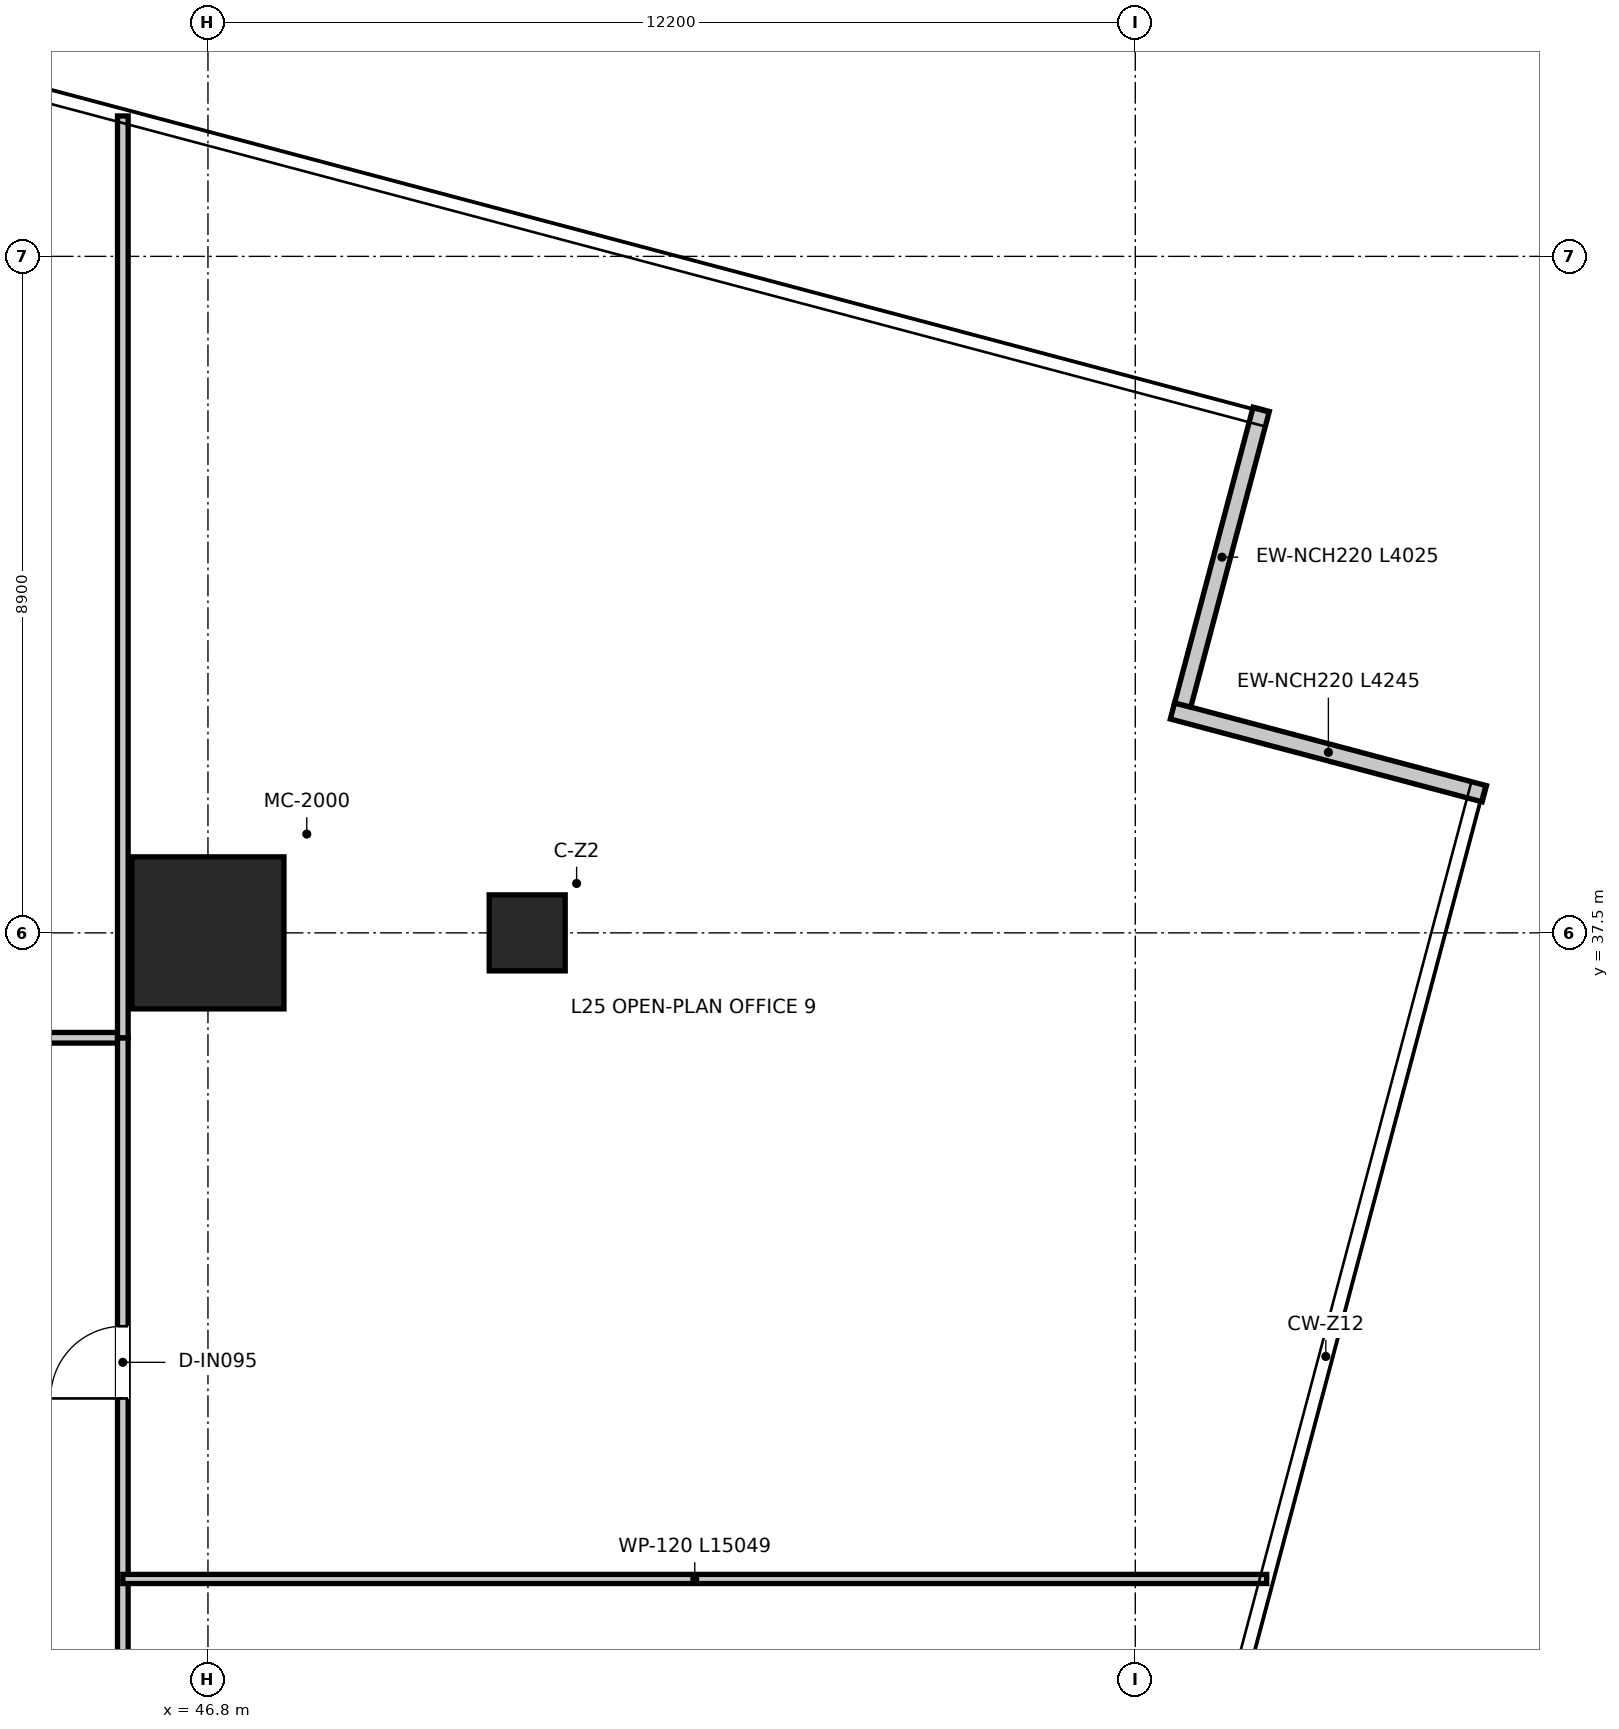
"""IFC4 building model, lengths in metres.
Left out: names, types, materials, properties, quantities, classifications, styles, units other than length and angle.
Written with IfcOpenShell. Run it as: python <this file> out.ifc"""

import sys

from ifc_helpers import new_model, si_unit, direction, frame, frame_2d, origin, origin_2d, place, context, subcontext, project, spatial, rectangle, extrude, source, transform, mapped, element, fill, save


model = new_model("IFC4")
c1 = context("Model", 3, precision=1e-05, world=origin(), true_north=direction((0.0, 1.0)))
c2 = subcontext(c1, "Body", "Model", "MODEL_VIEW")
j1 = project(units=[si_unit("LENGTHUNIT", "METRE"), si_unit("PLANEANGLEUNIT", "RADIAN")], contexts=[c1])
p1 = place(None, origin())
s1 = spatial("IfcSite", under=j1, at=p1, CompositionType="ELEMENT")
p2 = place(p1, origin())
s2 = spatial("IfcBuilding", under=s1, at=p2, CompositionType="ELEMENT")
p3 = place(p2, frame((0.0, 0.0, 105.85)))
s3 = spatial("IfcBuildingStorey", under=s2, at=p3, CompositionType="ELEMENT", Elevation=105.85)
m1 = source(origin(), c2, "Body", "SweptSolid", [
    extrude(rectangle(XDim=2.0, YDim=2.0, at=origin_2d()), origin(), (0.0, 0.0, 1.0), 3.95),
])
p4 = place(p3, frame((46.8, 37.5, 0.0), z_axis=(0.0, 0.0, 1.0), x_axis=(1.0, 0.0, 0.0)))
e1 = element("IfcColumn", 1, at=p4, inside=s3, PredefinedType="USERDEFINED", context=c2, shape_type="MappedRepresentation", body=[
    mapped(m1, transform((0.0, 0.0, 0.0), x_axis=(1.0, 0.0, 0.0), y_axis=(0.0, 1.0, 0.0), z_axis=(0.0, 0.0, 1.0), scale=1.0)),
])
m2 = source(origin(), c2, "Body", "SweptSolid", [
    extrude(rectangle(XDim=1.0, YDim=1.0, at=origin_2d()), origin(), (0.0, 0.0, 1.0), 3.95),
])
p5 = place(p3, frame((51.0, 37.5, 0.0), z_axis=(0.0, 0.0, 1.0), x_axis=(1.0, 0.0, 0.0)))
e2 = element("IfcColumn", 2, at=p5, inside=s3, PredefinedType="COLUMN", context=c2, shape_type="MappedRepresentation", body=[
    mapped(m2, transform((0.0, 0.0, 0.0), x_axis=(1.0, 0.0, 0.0), y_axis=(0.0, 1.0, 0.0), z_axis=(0.0, 0.0, 1.0), scale=1.0)),
])
p6 = place(p3, frame((63.592, 39.33, 0.0), z_axis=(0.0, 0.0, 1.0), x_axis=(-0.966482674278, 0.256731845164, 0.0)))
e3 = element("IfcWall", 3, at=p6, inside=s3, PredefinedType="ELEMENTEDWALL", context=c2, shape_type="SweptSolid", body=[
    extrude(rectangle(XDim=4.245, YDim=0.22, at=frame_2d((2.123, 0.0))), origin(), (0.0, 0.0, 1.0), 3.67),
])
p7 = place(p3, frame((59.624, 40.498, 0.0), z_axis=(0.0, 0.0, 1.0), x_axis=(0.256696053144, 0.966492181189, 0.0)))
e4 = element("IfcWall", 4, at=p7, inside=s3, PredefinedType="ELEMENTEDWALL", context=c2, shape_type="SweptSolid", body=[
    extrude(rectangle(XDim=4.025, YDim=0.22, at=frame_2d((2.012, 0.0))), origin(), (0.0, 0.0, 1.0), 3.67),
])
p8 = place(p3, frame((26.32, 36.12, 0.0), z_axis=(0.0, 0.0, 1.0), x_axis=(1.0, 0.0, 0.0)))
e5 = element("IfcWall", 5, at=p8, inside=s3, PredefinedType="PARTITIONING", context=c2, shape_type="SweptSolid", body=[
    extrude(rectangle(XDim=19.36, YDim=0.14, at=frame_2d((9.68, 0.0))), origin(), (0.0, 0.0, 1.0), 3.08),
])
p9 = place(p8, frame((1.265, 0.0, 0.0)))
e6 = element("IfcOpeningElement", 6, at=p9, cuts=e5, PredefinedType="OPENING", context=c2, shape_type="SweptSolid", body=[
    extrude(rectangle(XDim=0.95, YDim=2.1, at=frame_2d((0.475, 1.05))), frame((0.0, 0.08, 0.0), z_axis=(0.0, -1.0, 0.0), x_axis=(1.0, 0.0, 0.0)), (0.0, 0.0, 1.0), 0.16),
])
p10 = place(p8, frame((5.855, 0.0, 0.0)))
e7 = element("IfcOpeningElement", 7, at=p10, cuts=e5, PredefinedType="OPENING", context=c2, shape_type="SweptSolid", body=[
    extrude(rectangle(XDim=0.95, YDim=2.1, at=frame_2d((0.475, 1.05))), frame((0.0, 0.08, 0.0), z_axis=(0.0, -1.0, 0.0), x_axis=(1.0, 0.0, 0.0)), (0.0, 0.0, 1.0), 0.16),
])
p11 = place(p8, frame((11.555, 0.0, 0.0)))
e8 = element("IfcOpeningElement", 8, at=p11, cuts=e5, PredefinedType="OPENING", context=c2, shape_type="SweptSolid", body=[
    extrude(rectangle(XDim=0.95, YDim=2.1, at=frame_2d((0.475, 1.05))), frame((0.0, 0.08, 0.0), z_axis=(0.0, -1.0, 0.0), x_axis=(1.0, 0.0, 0.0)), (0.0, 0.0, 1.0), 0.16),
])
p12 = place(p8, frame((16.645, 0.0, 0.0)))
e9 = element("IfcOpeningElement", 9, at=p12, cuts=e5, PredefinedType="OPENING", context=c2, shape_type="SweptSolid", body=[
    extrude(rectangle(XDim=0.95, YDim=2.1, at=frame_2d((0.475, 1.05))), frame((0.0, 0.08, 0.0), z_axis=(0.0, -1.0, 0.0), x_axis=(1.0, 0.0, 0.0)), (0.0, 0.0, 1.0), 0.16),
])
p13 = place(p3, frame((45.68, 10.5, 0.0), z_axis=(0.0, 0.0, 1.0), x_axis=(0.0, 1.0, 0.0)))
e10 = element("IfcWall", 10, at=p13, inside=s3, PredefinedType="PARTITIONING", context=c2, shape_type="SweptSolid", body=[
    extrude(rectangle(XDim=25.62, YDim=0.14, at=frame_2d((12.81, 0.0))), origin(), (0.0, 0.0, 1.0), 2.97),
])
p14 = place(p13, frame((8.275, 0.0, 0.0)))
e11 = element("IfcOpeningElement", 11, at=p14, cuts=e10, PredefinedType="OPENING", context=c2, shape_type="SweptSolid", body=[
    extrude(rectangle(XDim=0.95, YDim=2.1, at=frame_2d((0.475, 1.05))), frame((0.0, 0.08, 0.0), z_axis=(0.0, -1.0, 0.0), x_axis=(1.0, 0.0, 0.0)), (0.0, 0.0, 1.0), 0.16),
])
p15 = place(p13, frame((14.025, 0.0, 0.0)))
e12 = element("IfcOpeningElement", 12, at=p15, cuts=e10, PredefinedType="OPENING", context=c2, shape_type="SweptSolid", body=[
    extrude(rectangle(XDim=0.95, YDim=2.1, at=frame_2d((0.475, 1.05))), frame((0.0, 0.08, 0.0), z_axis=(0.0, -1.0, 0.0), x_axis=(1.0, 0.0, 0.0)), (0.0, 0.0, 1.0), 0.16),
])
p16 = place(p13, frame((20.875, 0.0, 0.0)))
e13 = element("IfcOpeningElement", 13, at=p16, cuts=e10, PredefinedType="OPENING", context=c2, shape_type="SweptSolid", body=[
    extrude(rectangle(XDim=0.95, YDim=2.1, at=frame_2d((0.475, 1.05))), frame((0.0, 0.08, 0.0), z_axis=(0.0, -1.0, 0.0), x_axis=(1.0, 0.0, 0.0)), (0.0, 0.0, 1.0), 0.16),
])
p17 = place(p3, frame((45.68, 36.12, 0.0), z_axis=(0.0, 0.0, 1.0), x_axis=(0.0, 1.0, 0.0)))
e14 = element("IfcWall", 14, at=p17, inside=s3, PredefinedType="PARTITIONING", context=c2, shape_type="SweptSolid", body=[
    extrude(rectangle(XDim=12.127, YDim=0.14, at=frame_2d((6.063, 0.0))), origin(), (0.0, 0.0, 1.0), 2.97),
])
p18 = place(p3, frame((45.68, 29.0, 0.0), z_axis=(0.0, 0.0, 1.0), x_axis=(1.0, 0.0, 0.0)))
e15 = element("IfcWall", 15, at=p18, inside=s3, PredefinedType="PARTITIONING", context=c2, shape_type="SweptSolid", body=[
    extrude(rectangle(XDim=15.049, YDim=0.12, at=frame_2d((7.525, 0.0))), origin(), (0.0, 0.0, 1.0), 2.97),
])
p19 = place(p16, origin())
e16 = element("IfcDoor", 16, at=p19, inside=s3, OperationType="SINGLE_SWING_LEFT", PredefinedType="DOOR", context=c2, shape_type="SweptSolid", body=[
    extrude(rectangle(XDim=0.95, YDim=2.1, at=frame_2d((0.475, 1.05))), frame((0.0, 0.025, 0.0), z_axis=(0.0, -1.0, 0.0), x_axis=(1.0, 0.0, 0.0)), (0.0, 0.0, 1.0), 0.05),
])
fill(e13, e16)
save(model, sys.argv[1])
